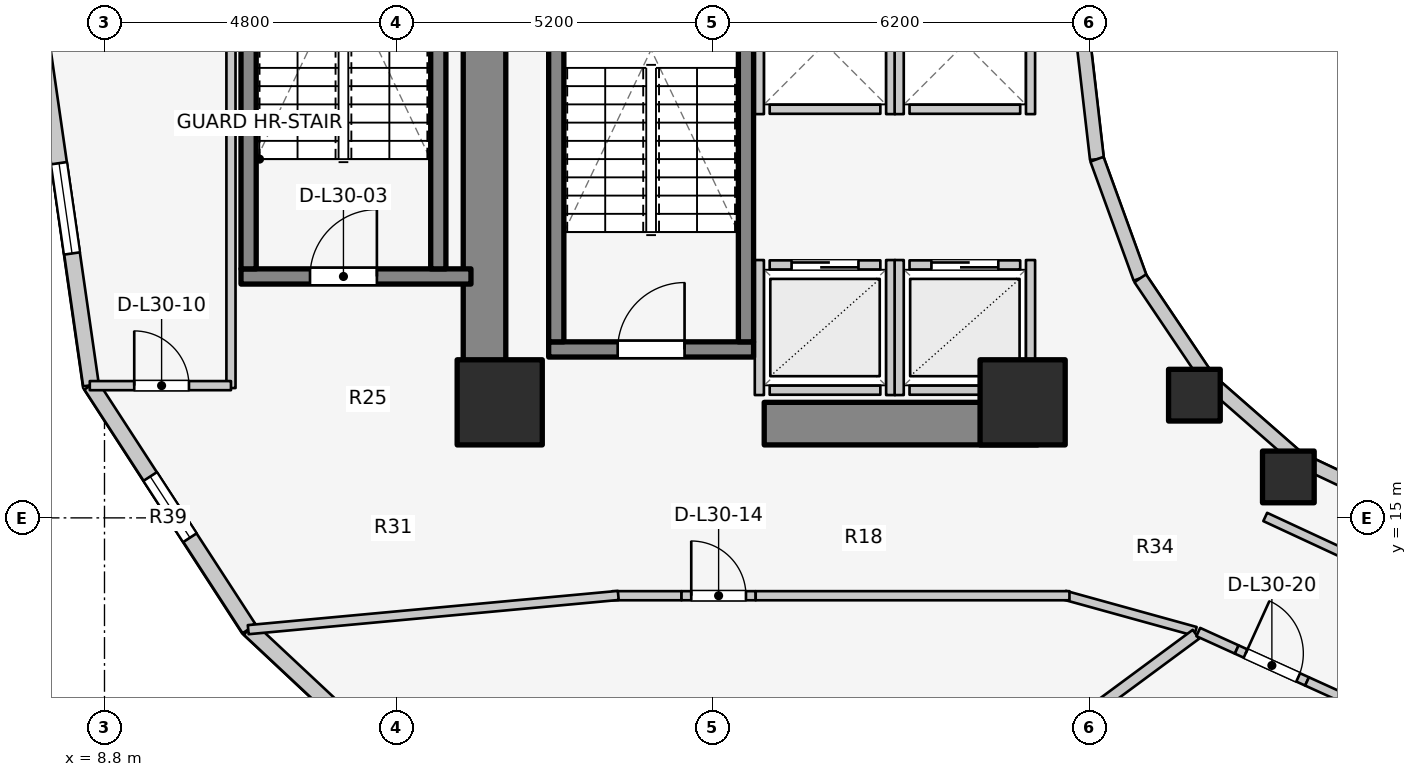
"""IFC4 building model, lengths in metres.
Left out: names, types, materials, properties, quantities, classifications, styles, units other than length and angle.
Written with IfcOpenShell. Run it as: python <this file> out.ifc"""

import sys

from ifc_helpers import new_model, si_unit, direction, frame, frame_2d, origin, origin_2d, place, context, subcontext, project, spatial, rectangle, extrude, element, fill, save


model = new_model("IFC4")
c1 = context("Model", 3, precision=1e-05, world=origin(), true_north=direction((0.0, 1.0)))
c2 = subcontext(c1, "Body", "Model", "MODEL_VIEW")
j1 = project(units=[si_unit("LENGTHUNIT", "METRE"), si_unit("PLANEANGLEUNIT", "RADIAN")], contexts=[c1])
p1 = place(None, origin())
s1 = spatial("IfcSite", under=j1, at=p1, CompositionType="ELEMENT")
p2 = place(p1, origin())
s2 = spatial("IfcBuilding", under=s1, at=p2, CompositionType="ELEMENT")
p3 = place(p2, frame((0.0, 0.0, 101.1)))
s3 = spatial("IfcBuildingStorey", under=s2, at=p3, CompositionType="ELEMENT", Elevation=101.1)
p4 = place(p3, frame((15.05, 17.05, 0.0), z_axis=(0.0, 0.0, 1.0), x_axis=(0.0, 1.0, 0.0)))
e1 = element("IfcWall", 1, at=p4, inside=s3, PredefinedType="SHEAR", context=c2, shape_type="SweptSolid", body=[
    extrude(rectangle(XDim=12.8, YDim=0.7, at=frame_2d((6.4, 0.0))), origin(), (0.0, 0.0, 1.0), 3.1),
])
p5 = place(p3, frame((19.65, 16.55, 0.0), z_axis=(0.0, 0.0, 1.0), x_axis=(1.0, 0.0, 0.0)))
e2 = element("IfcWall", 2, at=p5, inside=s3, PredefinedType="SHEAR", context=c2, shape_type="SweptSolid", body=[
    extrude(rectangle(XDim=4.5, YDim=0.7, at=frame_2d((2.25, 0.0))), origin(), (0.0, 0.0, 1.0), 3.1),
])
p6 = place(p3, frame((16.105, 17.77, 0.0), z_axis=(0.0, 0.0, 1.0), x_axis=(1.0, 0.0, 0.0)))
e3 = element("IfcWall", 3, at=p6, inside=s3, PredefinedType="SOLIDWALL", context=c2, shape_type="SweptSolid", body=[
    extrude(rectangle(XDim=3.37, YDim=0.25, at=frame_2d((1.685, 0.0))), origin(), (0.0, 0.0, 1.0), 3.1),
])
p7 = place(p6, frame((1.135, 0.0, 0.0)))
e4 = element("IfcOpeningElement", 4, at=p7, cuts=e3, PredefinedType="OPENING", context=c2, shape_type="SweptSolid", body=[
    extrude(rectangle(XDim=1.1, YDim=2.1, at=frame_2d((0.55, 1.05))), frame((0.0, 0.135, 0.0), z_axis=(0.0, -1.0, 0.0), x_axis=(1.0, 0.0, 0.0)), (0.0, 0.0, 1.0), 0.27),
])
for number, where, z_axis, x_axis in (
    (5, (16.23, 17.895, 0.0), (0.0, 0.0, 1.0), (0.0, 1.0, 0.0)),
    (6, (19.35, 17.895, 0.0), (0.0, 0.0, 1.0), (0.0, 1.0, 0.0)),
):
    element("IfcWall", number, at=place(p3, frame(where, z_axis=z_axis, x_axis=x_axis)), inside=s3, PredefinedType="SOLIDWALL", context=c2, shape_type="SweptSolid", body=[
        extrude(rectangle(XDim=7.81, YDim=0.25, at=frame_2d((3.905, 0.0))), origin(), (0.0, 0.0, 1.0), 3.1),
    ])
p8 = place(p3, frame((11.045, 18.97, 0.0), z_axis=(0.0, 0.0, 1.0), x_axis=(1.0, 0.0, 0.0)))
e7 = element("IfcWall", 7, at=p8, inside=s3, PredefinedType="SOLIDWALL", context=c2, shape_type="SweptSolid", body=[
    extrude(rectangle(XDim=3.782, YDim=0.25, at=frame_2d((1.891, 0.0))), origin(), (0.0, 0.0, 1.0), 3.1),
])
p9 = place(p8, frame((1.135, 0.0, 0.0)))
e8 = element("IfcOpeningElement", 8, at=p9, cuts=e7, PredefinedType="OPENING", context=c2, shape_type="SweptSolid", body=[
    extrude(rectangle(XDim=1.1, YDim=2.1, at=frame_2d((0.55, 1.05))), frame((0.0, 0.135, 0.0), z_axis=(0.0, -1.0, 0.0), x_axis=(1.0, 0.0, 0.0)), (0.0, 0.0, 1.0), 0.27),
])
for number, where, z_axis, x_axis in (
    (9, (11.17, 19.095, 0.0), (0.0, 0.0, 1.0), (0.0, 1.0, 0.0)),
    (10, (14.29, 19.095, 0.0), (0.0, 0.0, 1.0), (0.0, 1.0, 0.0)),
):
    element("IfcWall", number, at=place(p3, frame(where, z_axis=z_axis, x_axis=x_axis)), inside=s3, PredefinedType="SOLIDWALL", context=c2, shape_type="SweptSolid", body=[
        extrude(rectangle(XDim=7.81, YDim=0.25, at=frame_2d((3.905, 0.0))), origin(), (0.0, 0.0, 1.0), 3.1),
    ])
for number, where, z_axis, x_axis in (
    (11, (15.3, 16.9, 0.0), (0.0, 0.0, 1.0), (1.0, 0.0, 0.0)),
    (12, (23.9, 16.9, 0.0), (0.0, 0.0, 1.0), (1.0, 0.0, 0.0)),
):
    element("IfcColumn", number, at=place(p3, frame(where, z_axis=z_axis, x_axis=x_axis)), inside=s3, PredefinedType="COLUMN", context=c2, shape_type="SweptSolid", body=[
        extrude(rectangle(XDim=1.4, YDim=1.4, at=origin_2d()), origin(), (0.0, 0.0, 1.0), 3.1),
    ])
for number, where, z_axis, x_axis in (
    (13, (26.725, 17.018, 0.0), (0.0, 0.0, 1.0), (1.0, 0.0, 0.0)),
    (14, (28.27, 15.673, 0.0), (0.0, 0.0, 1.0), (1.0, 0.0, 0.0)),
):
    element("IfcColumn", number, at=place(p3, frame(where, z_axis=z_axis, x_axis=x_axis)), inside=s3, PredefinedType="COLUMN", context=c2, shape_type="SweptSolid", body=[
        extrude(rectangle(XDim=0.85, YDim=0.85, at=origin_2d()), origin(), (0.0, 0.0, 1.0), 3.1),
    ])
p10 = place(p3, frame((24.88, 23.0, 0.0), z_axis=(0.0, 0.0, 1.0), x_axis=(0.114711713601, -0.993398823617, 0.0)))
e15 = element("IfcWall", 15, at=p10, inside=s3, PredefinedType="STANDARD", context=c2, shape_type="SweptSolid", body=[
    extrude(rectangle(XDim=2.115, YDim=0.23, at=frame_2d((1.058, 0.0))), origin(), (0.0, 0.0, 1.0), 2.56),
])
p11 = place(p3, frame((25.123, 20.898, 0.0), z_axis=(0.0, 0.0, 1.0), x_axis=(0.341423187295, -0.93990968033, 0.0)))
e16 = element("IfcWall", 16, at=p11, inside=s3, PredefinedType="STANDARD", context=c2, shape_type="SweptSolid", body=[
    extrude(rectangle(XDim=2.084, YDim=0.23, at=frame_2d((1.042, 0.0))), origin(), (0.0, 0.0, 1.0), 2.56),
])
p12 = place(p3, frame((25.834, 18.94, 0.0), z_axis=(0.0, 0.0, 1.0), x_axis=(0.558197800898, -0.829707909492, 0.0)))
e17 = element("IfcWall", 17, at=p12, inside=s3, PredefinedType="STANDARD", context=c2, shape_type="SweptSolid", body=[
    extrude(rectangle(XDim=2.027, YDim=0.23, at=frame_2d((1.013, 0.0))), origin(), (0.0, 0.0, 1.0), 1.22),
])
p13 = place(p3, frame((26.965, 17.258, 0.0), z_axis=(0.0, 0.0, 1.0), x_axis=(0.752576694707, -0.658504607869, 0.0)))
e18 = element("IfcWall", 18, at=p13, inside=s3, PredefinedType="STANDARD", context=c2, shape_type="SweptSolid", body=[
    extrude(rectangle(XDim=1.959, YDim=0.23, at=frame_2d((0.98, 0.0))), origin(), (0.0, 0.0, 1.0), 1.22),
])
p14 = place(p3, frame((28.44, 15.968, 0.0), z_axis=(0.0, 0.0, 1.0), x_axis=(0.904179699603, -0.427152280606, 0.0)))
e19 = element("IfcWall", 19, at=p14, inside=s3, PredefinedType="STANDARD", context=c2, shape_type="SweptSolid", body=[
    extrude(rectangle(XDim=1.899, YDim=0.23, at=frame_2d((0.95, 0.0))), origin(), (0.0, 0.0, 1.0), 1.22),
])
p15 = place(p3, frame((7.74, 23.0, 0.0), z_axis=(0.0, 0.0, 1.0), x_axis=(0.142572472068, -0.98978436551, 0.0)))
e20 = element("IfcWall", 20, at=p15, inside=s3, PredefinedType="STANDARD", context=c2, shape_type="SweptSolid", body=[
    extrude(rectangle(XDim=5.879, YDim=0.26, at=frame_2d((2.939, 0.0))), origin(), (0.0, 0.0, 1.0), 2.57),
])
p16 = place(p15, frame((2.189, 0.0, 0.75)))
e21 = element("IfcOpeningElement", 21, at=p16, cuts=e20, PredefinedType="OPENING", context=c2, shape_type="SweptSolid", body=[
    extrude(rectangle(XDim=1.5, YDim=1.6, at=frame_2d((0.75, 0.8))), frame((0.0, 0.14, 0.0), z_axis=(0.0, -1.0, 0.0), x_axis=(1.0, 0.0, 0.0)), (0.0, 0.0, 1.0), 0.28),
])
p17 = place(p3, frame((8.578, 17.181, 0.0), z_axis=(0.0, 0.0, 1.0), x_axis=(0.544388392991, -0.838833283541, 0.0)))
e22 = element("IfcWall", 22, at=p17, inside=s3, PredefinedType="STANDARD", context=c2, shape_type="SweptSolid", body=[
    extrude(rectangle(XDim=4.778, YDim=0.26, at=frame_2d((2.389, 0.0))), origin(), (0.0, 0.0, 1.0), 1.22),
])
p18 = place(p17, frame((1.789, 0.0, 0.15)))
e23 = element("IfcOpeningElement", 23, at=p18, cuts=e22, PredefinedType="OPENING", context=c2, shape_type="SweptSolid", body=[
    extrude(rectangle(XDim=1.2, YDim=0.9, at=frame_2d((0.6, 0.45))), frame((0.0, 0.14, 0.0), z_axis=(0.0, -1.0, 0.0), x_axis=(1.0, 0.0, 0.0)), (0.0, 0.0, 1.0), 0.28),
])
p19 = place(p3, frame((11.179, 13.173, 0.0), z_axis=(0.0, 0.0, 1.0), x_axis=(0.730162452258, -0.68327358599, 0.0)))
e24 = element("IfcWall", 24, at=p19, inside=s3, PredefinedType="STANDARD", context=c2, shape_type="SweptSolid", body=[
    extrude(rectangle(XDim=4.868, YDim=0.26, at=frame_2d((2.434, 0.0))), origin(), (0.0, 0.0, 1.0), 1.22),
])
p20 = place(p19, frame((1.834, 0.0, 0.15)))
e25 = element("IfcOpeningElement", 25, at=p20, cuts=e24, PredefinedType="OPENING", context=c2, shape_type="SweptSolid", body=[
    extrude(rectangle(XDim=1.2, YDim=0.9, at=frame_2d((0.6, 0.45))), frame((0.0, 0.14, 0.0), z_axis=(0.0, -1.0, 0.0), x_axis=(1.0, 0.0, 0.0)), (0.0, 0.0, 1.0), 0.28),
])
p21 = place(p3, frame((19.74, 19.16, 0.0), z_axis=(0.0, 0.0, 1.0), x_axis=(1.0, 0.0, 0.0)))
e26 = element("IfcWall", 26, at=p21, inside=s3, PredefinedType="SOLIDWALL", context=c2, shape_type="SweptSolid", body=[
    extrude(rectangle(XDim=1.82, YDim=0.15, at=frame_2d((0.91, 0.0))), origin(), (0.0, 0.0, 1.0), 2.575),
])
p22 = place(p21, frame((0.36, 0.0, 0.0)))
e27 = element("IfcOpeningElement", 27, at=p22, cuts=e26, PredefinedType="OPENING", context=c2, shape_type="SweptSolid", body=[
    extrude(rectangle(XDim=1.1, YDim=2.1, at=frame_2d((0.55, 1.05))), frame((0.0, 0.085, 0.0), z_axis=(0.0, -1.0, 0.0), x_axis=(1.0, 0.0, 0.0)), (0.0, 0.0, 1.0), 0.17),
])
p23 = place(p3, frame((19.74, 17.1, 0.0), z_axis=(0.0, 0.0, 1.0), x_axis=(1.0, 0.0, 0.0)))
e28 = element("IfcWall", 28, at=p23, inside=s3, PredefinedType="SOLIDWALL", context=c2, shape_type="SweptSolid", body=[
    extrude(rectangle(XDim=1.82, YDim=0.15, at=frame_2d((0.91, 0.0))), origin(), (0.0, 0.0, 1.0), 2.575),
])
p24 = place(p3, frame((19.57, 17.02, 0.0), z_axis=(0.0, 0.0, 1.0), x_axis=(0.0, 1.0, 0.0)))
e29 = element("IfcWall", 29, at=p24, inside=s3, PredefinedType="SOLIDWALL", context=c2, shape_type="SweptSolid", body=[
    extrude(rectangle(XDim=2.22, YDim=0.15, at=frame_2d((1.11, 0.0))), origin(), (0.0, 0.0, 1.0), 2.12),
])
p25 = place(p3, frame((21.73, 17.02, 0.0), z_axis=(0.0, 0.0, 1.0), x_axis=(0.0, 1.0, 0.0)))
e30 = element("IfcWall", 30, at=p25, inside=s3, PredefinedType="SOLIDWALL", context=c2, shape_type="SweptSolid", body=[
    extrude(rectangle(XDim=2.22, YDim=0.15, at=frame_2d((1.11, 0.0))), origin(), (0.0, 0.0, 1.0), 2.575),
])
p26 = place(p3, frame((22.04, 19.16, 0.0), z_axis=(0.0, 0.0, 1.0), x_axis=(1.0, 0.0, 0.0)))
e31 = element("IfcWall", 31, at=p26, inside=s3, PredefinedType="SOLIDWALL", context=c2, shape_type="SweptSolid", body=[
    extrude(rectangle(XDim=1.82, YDim=0.15, at=frame_2d((0.91, 0.0))), origin(), (0.0, 0.0, 1.0), 2.12),
])
p27 = place(p26, frame((0.36, 0.0, 0.0)))
e32 = element("IfcOpeningElement", 32, at=p27, cuts=e31, PredefinedType="OPENING", context=c2, shape_type="SweptSolid", body=[
    extrude(rectangle(XDim=1.1, YDim=2.1, at=frame_2d((0.55, 1.05))), frame((0.0, 0.085, 0.0), z_axis=(0.0, -1.0, 0.0), x_axis=(1.0, 0.0, 0.0)), (0.0, 0.0, 1.0), 0.17),
])
p28 = place(p3, frame((22.04, 17.1, 0.0), z_axis=(0.0, 0.0, 1.0), x_axis=(1.0, 0.0, 0.0)))
e33 = element("IfcWall", 33, at=p28, inside=s3, PredefinedType="SOLIDWALL", context=c2, shape_type="SweptSolid", body=[
    extrude(rectangle(XDim=1.82, YDim=0.15, at=frame_2d((0.91, 0.0))), origin(), (0.0, 0.0, 1.0), 2.12),
])
p29 = place(p3, frame((21.87, 17.02, 0.0), z_axis=(0.0, 0.0, 1.0), x_axis=(0.0, 1.0, 0.0)))
e34 = element("IfcWall", 34, at=p29, inside=s3, PredefinedType="SOLIDWALL", context=c2, shape_type="SweptSolid", body=[
    extrude(rectangle(XDim=2.22, YDim=0.15, at=frame_2d((1.11, 0.0))), origin(), (0.0, 0.0, 1.0), 2.575),
])
p30 = place(p3, frame((24.03, 17.02, 0.0), z_axis=(0.0, 0.0, 1.0), x_axis=(0.0, 1.0, 0.0)))
e35 = element("IfcWall", 35, at=p30, inside=s3, PredefinedType="SOLIDWALL", context=c2, shape_type="SweptSolid", body=[
    extrude(rectangle(XDim=2.22, YDim=0.15, at=frame_2d((1.11, 0.0))), origin(), (0.0, 0.0, 1.0), 1.873),
])
p31 = place(p3, frame((19.74, 21.72, 0.0), z_axis=(0.0, 0.0, 1.0), x_axis=(1.0, 0.0, 0.0)))
e36 = element("IfcWall", 36, at=p31, inside=s3, PredefinedType="SOLIDWALL", context=c2, shape_type="SweptSolid", body=[
    extrude(rectangle(XDim=1.82, YDim=0.15, at=frame_2d((0.91, 0.0))), origin(), (0.0, 0.0, 1.0), 2.575),
])
for number, where, z_axis, x_axis in (
    (37, (19.57, 21.64, 0.0), (0.0, 0.0, 1.0), (0.0, 1.0, 0.0)),
    (38, (21.73, 21.64, 0.0), (0.0, 0.0, 1.0), (0.0, 1.0, 0.0)),
):
    element("IfcWall", number, at=place(p3, frame(where, z_axis=z_axis, x_axis=x_axis)), inside=s3, PredefinedType="SOLIDWALL", context=c2, shape_type="SweptSolid", body=[
        extrude(rectangle(XDim=2.32, YDim=0.15, at=frame_2d((1.16, 0.0))), origin(), (0.0, 0.0, 1.0), 2.575),
    ])
p32 = place(p3, frame((22.04, 21.72, 0.0), z_axis=(0.0, 0.0, 1.0), x_axis=(1.0, 0.0, 0.0)))
e39 = element("IfcWall", 39, at=p32, inside=s3, PredefinedType="SOLIDWALL", context=c2, shape_type="SweptSolid", body=[
    extrude(rectangle(XDim=1.82, YDim=0.15, at=frame_2d((0.91, 0.0))), origin(), (0.0, 0.0, 1.0), 2.12),
])
p33 = place(p3, frame((21.87, 21.64, 0.0), z_axis=(0.0, 0.0, 1.0), x_axis=(0.0, 1.0, 0.0)))
e40 = element("IfcWall", 40, at=p33, inside=s3, PredefinedType="SOLIDWALL", context=c2, shape_type="SweptSolid", body=[
    extrude(rectangle(XDim=2.32, YDim=0.15, at=frame_2d((1.16, 0.0))), origin(), (0.0, 0.0, 1.0), 2.575),
])
p34 = place(p3, frame((24.03, 21.64, 0.0), z_axis=(0.0, 0.0, 1.0), x_axis=(0.0, 1.0, 0.0)))
e41 = element("IfcWall", 41, at=p34, inside=s3, PredefinedType="SOLIDWALL", context=c2, shape_type="SweptSolid", body=[
    extrude(rectangle(XDim=2.32, YDim=0.15, at=frame_2d((1.16, 0.0))), origin(), (0.0, 0.0, 1.0), 2.12),
])
p35 = place(p3, frame((27.89, 15.015, 0.0), z_axis=(0.0, 0.0, 1.0), x_axis=(0.906943449489, -0.421252393975, 0.0)))
e42 = element("IfcWall", 42, at=p35, inside=s3, PredefinedType="PARTITIONING", context=c2, shape_type="SweptSolid", body=[
    extrude(rectangle(XDim=2.186, YDim=0.15, at=frame_2d((1.093, 0.0))), origin(), (0.0, 0.0, 1.0), 1.992),
])
p36 = place(p3, frame((10.88, 17.135, 0.0), z_axis=(0.0, 0.0, 1.0), x_axis=(0.0, 1.0, 0.0)))
e43 = element("IfcWall", 43, at=p36, inside=s3, PredefinedType="PARTITIONING", context=c2, shape_type="SweptSolid", body=[
    extrude(rectangle(XDim=11.73, YDim=0.15, at=frame_2d((5.865, 0.0))), origin(), (0.0, 0.0, 1.0), 2.12),
])
p37 = place(p3, frame((8.558, 17.175, 0.0), z_axis=(0.0, 0.0, 1.0), x_axis=(1.0, 0.0, 0.0)))
e44 = element("IfcWall", 44, at=p37, inside=s3, PredefinedType="PARTITIONING", context=c2, shape_type="SweptSolid", body=[
    extrude(rectangle(XDim=2.322, YDim=0.15, at=frame_2d((1.161, 0.0))), origin(), (0.0, 0.0, 1.0), 2.575),
])
p38 = place(p37, frame((0.731, 0.0, 0.0)))
e45 = element("IfcOpeningElement", 45, at=p38, cuts=e44, PredefinedType="OPENING", context=c2, shape_type="SweptSolid", body=[
    extrude(rectangle(XDim=0.9, YDim=2.1, at=frame_2d((0.45, 1.05))), frame((0.0, 0.085, 0.0), z_axis=(0.0, -1.0, 0.0), x_axis=(1.0, 0.0, 0.0)), (0.0, 0.0, 1.0), 0.17),
])
p39 = place(p3, frame((26.742, 13.133, 0.0), z_axis=(0.0, 0.0, 1.0), x_axis=(-0.963833843713, 0.266503886865, 0.0)))
e46 = element("IfcWall", 46, at=p39, inside=s3, PredefinedType="PARTITIONING", context=c2, shape_type="SweptSolid", body=[
    extrude(rectangle(XDim=2.232, YDim=0.15, at=frame_2d((1.116, 0.0))), origin(), (0.0, 0.0, 1.0), 1.992),
])
p40 = place(p3, frame((17.15, 13.72, 0.0), z_axis=(0.0, 0.0, 1.0), x_axis=(1.0, 0.0, 0.0)))
e47 = element("IfcWall", 47, at=p40, inside=s3, PredefinedType="PARTITIONING", context=c2, shape_type="SweptSolid", body=[
    extrude(rectangle(XDim=1.14, YDim=0.15, at=frame_2d((0.57, 0.0))), origin(), (0.0, 0.0, 1.0), 2.575),
])
p41 = place(p3, frame((18.29, 13.72, 0.0), z_axis=(0.0, 0.0, 1.0), x_axis=(1.0, 0.0, 0.0)))
e48 = element("IfcWall", 48, at=p41, inside=s3, PredefinedType="PARTITIONING", context=c2, shape_type="SweptSolid", body=[
    extrude(rectangle(XDim=1.22, YDim=0.15, at=frame_2d((0.61, 0.0))), origin(), (0.0, 0.0, 1.0), 2.575),
])
p42 = place(p41, frame((0.16, 0.0, 0.0)))
e49 = element("IfcOpeningElement", 49, at=p42, cuts=e48, PredefinedType="OPENING", context=c2, shape_type="SweptSolid", body=[
    extrude(rectangle(XDim=0.9, YDim=2.1, at=frame_2d((0.45, 1.05))), frame((0.0, 0.085, 0.0), z_axis=(0.0, -1.0, 0.0), x_axis=(1.0, 0.0, 0.0)), (0.0, 0.0, 1.0), 0.17),
])
p43 = place(p3, frame((19.51, 13.72, 0.0), z_axis=(0.0, 0.0, 1.0), x_axis=(1.0, 0.0, 0.0)))
e50 = element("IfcWall", 50, at=p43, inside=s3, PredefinedType="PARTITIONING", context=c2, shape_type="SweptSolid", body=[
    extrude(rectangle(XDim=5.16, YDim=0.15, at=frame_2d((2.58, 0.0))), origin(), (0.0, 0.0, 1.0), 1.992),
])
p44 = place(p3, frame((17.25, 13.725, 0.0), z_axis=(0.0, 0.0, 1.0), x_axis=(-0.995748209098, -0.092116795851, 0.0)))
e51 = element("IfcWall", 51, at=p44, inside=s3, PredefinedType="PARTITIONING", context=c2, shape_type="SweptSolid", body=[
    extrude(rectangle(XDim=6.112, YDim=0.15, at=frame_2d((3.056, 0.0))), origin(), (0.0, 0.0, 1.0), 1.22),
])
p45 = place(p3, frame((26.751, 13.086, 0.0), z_axis=(0.0, 0.0, 1.0), x_axis=(-0.80430981394, -0.594210167533, 0.0)))
e52 = element("IfcWall", 52, at=p45, inside=s3, PredefinedType="PARTITIONING", context=c2, shape_type="SweptSolid", body=[
    extrude(rectangle(XDim=9.146, YDim=0.18, at=frame_2d((4.573, 0.0))), origin(), (0.0, 0.0, 1.0), 1.22),
])
p46 = place(p3, frame((26.789, 13.123, 0.0), z_axis=(0.0, 0.0, 1.0), x_axis=(0.910534957096, -0.413432088627, 0.0)))
e53 = element("IfcWall", 53, at=p46, inside=s3, PredefinedType="PARTITIONING", context=c2, shape_type="SweptSolid", body=[
    extrude(rectangle(XDim=0.694, YDim=0.15, at=frame_2d((0.347, 0.0))), origin(), (0.0, 0.0, 1.0), 2.575),
])
p47 = place(p3, frame((27.421, 12.835, 0.0), z_axis=(0.0, 0.0, 1.0), x_axis=(0.910563905594, -0.413368327075, 0.0)))
e54 = element("IfcWall", 54, at=p47, inside=s3, PredefinedType="PARTITIONING", context=c2, shape_type="SweptSolid", body=[
    extrude(rectangle(XDim=1.27, YDim=0.15, at=frame_2d((0.635, 0.0))), origin(), (0.0, 0.0, 1.0), 2.16),
])
p48 = place(p47, frame((0.16, 0.0, 0.0)))
e55 = element("IfcOpeningElement", 55, at=p48, cuts=e54, PredefinedType="OPENING", context=c2, shape_type="SweptSolid", body=[
    extrude(rectangle(XDim=0.95, YDim=2.1, at=frame_2d((0.475, 1.05))), frame((0.0, 0.085, 0.0), z_axis=(0.0, -1.0, 0.0), x_axis=(1.0, 0.0, 0.0)), (0.0, 0.0, 1.0), 0.17),
])
p49 = place(p3, frame((28.577, 12.311, 0.0), z_axis=(0.0, 0.0, 1.0), x_axis=(0.910604459832, -0.413278982932, 0.0)))
e56 = element("IfcWall", 56, at=p49, inside=s3, PredefinedType="PARTITIONING", context=c2, shape_type="SweptSolid", body=[
    extrude(rectangle(XDim=0.808, YDim=0.15, at=frame_2d((0.404, 0.0))), origin(), (0.0, 0.0, 1.0), 1.992),
])
p50 = place(p16, origin())
e57 = element("IfcWindow", 57, at=p50, inside=s3, PartitioningType="SINGLE_PANEL", PredefinedType="WINDOW", context=c2, shape_type="SweptSolid", body=[
    extrude(rectangle(XDim=1.5, YDim=1.6, at=frame_2d((0.75, 0.8))), frame((0.0, 0.03, 0.0), z_axis=(0.0, -1.0, 0.0), x_axis=(1.0, 0.0, 0.0)), (0.0, 0.0, 1.0), 0.06),
])
fill(e21, e57)
p51 = place(p18, origin())
e58 = element("IfcWindow", 58, at=p51, inside=s3, PartitioningType="SINGLE_PANEL", PredefinedType="WINDOW", context=c2, shape_type="SweptSolid", body=[
    extrude(rectangle(XDim=1.2, YDim=0.9, at=frame_2d((0.6, 0.45))), frame((0.0, 0.03, 0.0), z_axis=(0.0, -1.0, 0.0), x_axis=(1.0, 0.0, 0.0)), (0.0, 0.0, 1.0), 0.06),
])
fill(e23, e58)
p52 = place(p7, origin())
e59 = element("IfcDoor", 59, at=p52, inside=s3, OperationType="SINGLE_SWING_RIGHT", PredefinedType="DOOR", context=c2, shape_type="SweptSolid", body=[
    extrude(rectangle(XDim=1.1, YDim=2.1, at=frame_2d((0.55, 1.05))), frame((0.0, 0.025, 0.0), z_axis=(0.0, -1.0, 0.0), x_axis=(1.0, 0.0, 0.0)), (0.0, 0.0, 1.0), 0.05),
])
fill(e4, e59)
p53 = place(p9, origin())
e60 = element("IfcDoor", 60, at=p53, inside=s3, OperationType="SINGLE_SWING_RIGHT", PredefinedType="DOOR", context=c2, shape_type="SweptSolid", body=[
    extrude(rectangle(XDim=1.1, YDim=2.1, at=frame_2d((0.55, 1.05))), frame((0.0, 0.025, 0.0), z_axis=(0.0, -1.0, 0.0), x_axis=(1.0, 0.0, 0.0)), (0.0, 0.0, 1.0), 0.05),
])
fill(e8, e60)
p54 = place(p22, origin())
e61 = element("IfcDoor", 61, at=p54, inside=s3, OperationType="DOUBLE_DOOR_SLIDING", PredefinedType="DOOR", context=c2, shape_type="SweptSolid", body=[
    extrude(rectangle(XDim=1.1, YDim=2.1, at=frame_2d((0.55, 1.05))), frame((0.0, 0.025, 0.0), z_axis=(0.0, -1.0, 0.0), x_axis=(1.0, 0.0, 0.0)), (0.0, 0.0, 1.0), 0.05),
])
fill(e27, e61)
p55 = place(p27, origin())
e62 = element("IfcDoor", 62, at=p55, inside=s3, OperationType="DOUBLE_DOOR_SLIDING", PredefinedType="DOOR", context=c2, shape_type="SweptSolid", body=[
    extrude(rectangle(XDim=1.1, YDim=2.1, at=frame_2d((0.55, 1.05))), frame((0.0, 0.025, 0.0), z_axis=(0.0, -1.0, 0.0), x_axis=(1.0, 0.0, 0.0)), (0.0, 0.0, 1.0), 0.05),
])
fill(e32, e62)
p56 = place(p38, origin())
e63 = element("IfcDoor", 63, at=p56, inside=s3, OperationType="SINGLE_SWING_LEFT", PredefinedType="DOOR", context=c2, shape_type="SweptSolid", body=[
    extrude(rectangle(XDim=0.9, YDim=2.1, at=frame_2d((0.45, 1.05))), frame((0.0, 0.025, 0.0), z_axis=(0.0, -1.0, 0.0), x_axis=(1.0, 0.0, 0.0)), (0.0, 0.0, 1.0), 0.05),
])
fill(e45, e63)
p57 = place(p42, origin())
e64 = element("IfcDoor", 64, at=p57, inside=s3, OperationType="SINGLE_SWING_LEFT", PredefinedType="DOOR", context=c2, shape_type="SweptSolid", body=[
    extrude(rectangle(XDim=0.9, YDim=2.1, at=frame_2d((0.45, 1.05))), frame((0.0, 0.025, 0.0), z_axis=(0.0, -1.0, 0.0), x_axis=(1.0, 0.0, 0.0)), (0.0, 0.0, 1.0), 0.05),
])
fill(e49, e64)
p58 = place(p48, origin())
e65 = element("IfcDoor", 65, at=p58, inside=s3, OperationType="SINGLE_SWING_LEFT", PredefinedType="DOOR", context=c2, shape_type="SweptSolid", body=[
    extrude(rectangle(XDim=0.95, YDim=2.1, at=frame_2d((0.475, 1.05))), frame((0.0, 0.025, 0.0), z_axis=(0.0, -1.0, 0.0), x_axis=(1.0, 0.0, 0.0)), (0.0, 0.0, 1.0), 0.05),
])
fill(e55, e65)
save(model, sys.argv[1])
